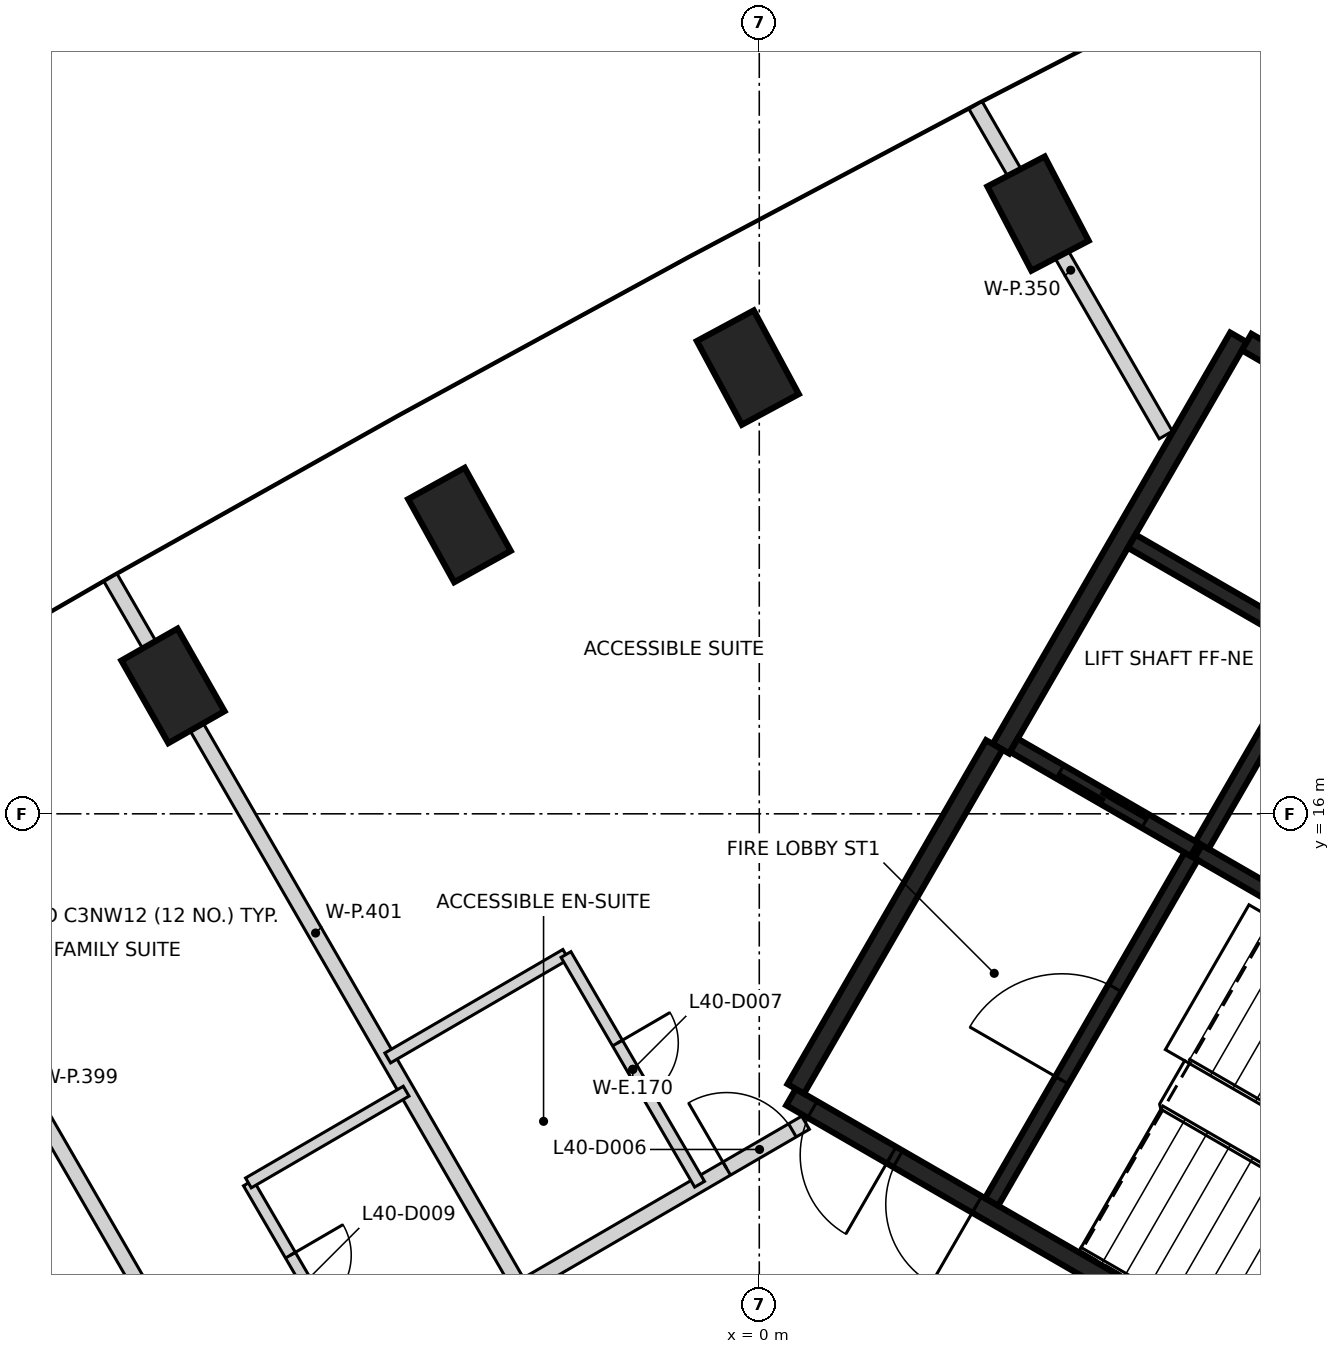
"""IFC4 building model, lengths in metres.
Left out: names, types, materials, properties, quantities, classifications, styles, units other than length and angle.
Written with IfcOpenShell. Run it as: python <this file> out.ifc"""

import sys

from ifc_helpers import new_model, si_unit, direction, frame, frame_2d, origin, origin_2d, place, context, subcontext, project, spatial, rectangle, extrude, element, fill, save


model = new_model("IFC4")
c1 = context("Model", 3, precision=1e-05, world=origin(), true_north=direction((0.0, 1.0)))
c2 = subcontext(c1, "Body", "Model", "MODEL_VIEW")
j1 = project(units=[si_unit("LENGTHUNIT", "METRE"), si_unit("PLANEANGLEUNIT", "RADIAN")], contexts=[c1])
p1 = place(None, origin())
s1 = spatial("IfcSite", under=j1, at=p1, CompositionType="ELEMENT")
p2 = place(p1, origin())
s2 = spatial("IfcBuilding", under=s1, at=p2, CompositionType="ELEMENT")
p3 = place(p2, frame((0.0, 0.0, 161.2)))
s3 = spatial("IfcBuildingStorey", under=s2, at=p3, CompositionType="ELEMENT", Elevation=161.2)
for number, where, z_axis, x_axis in (
    (1, (3.667, 23.896, -0.4), (0.0, 0.0, 1.0), (-0.463, 0.886, 0.0)),
    (2, (-0.151, 21.871, -0.4), (0.0, 0.0, 1.0), (-0.474, 0.881, 0.0)),
    (3, (-3.945, 19.8, -0.4), (0.0, 0.0, 1.0), (-0.485, 0.875, 0.0)),
    (4, (-7.714, 17.683, -0.4), (0.0, 0.0, 1.0), (-0.495, 0.869, 0.0)),
):
    element("IfcColumn", number, at=place(p3, frame(where, z_axis=z_axis, x_axis=x_axis)), inside=s3, PredefinedType="COLUMN", context=c2, shape_type="SweptSolid", body=[
        extrude(rectangle(XDim=1.25, YDim=0.85, at=origin_2d()), origin(), (0.0, 0.0, 1.0), 2.884),
    ])
p4 = place(p3, frame((10.42, 6.498, 0.0), z_axis=(0.0, 0.0, 1.0), x_axis=(-0.866021906294, 0.500006057782, 0.0)))
e5 = element("IfcWall", 5, at=p4, inside=s3, PredefinedType="SHEAR", context=c2, shape_type="SweptSolid", body=[
    extrude(rectangle(XDim=11.55, YDim=0.25, at=frame_2d((5.775, 0.0))), origin(), (0.0, 0.0, 1.0), 3.2),
])
p5 = place(p4, frame((10.025, 0.0, 0.0)))
e6 = element("IfcOpeningElement", 6, at=p5, cuts=e5, PredefinedType="OPENING", context=c2, shape_type="SweptSolid", body=[
    extrude(rectangle(XDim=1.2, YDim=2.1, at=frame_2d((0.6, 1.05))), frame((0.0, 0.135, 0.0), z_axis=(0.0, -1.0, 0.0), x_axis=(1.0, 0.0, 0.0)), (0.0, 0.0, 1.0), 0.27),
])
p6 = place(p4, frame((8.725, 0.0, 0.0)))
e7 = element("IfcOpeningElement", 7, at=p6, cuts=e5, PredefinedType="OPENING", context=c2, shape_type="SweptSolid", body=[
    extrude(rectangle(XDim=1.2, YDim=2.1, at=frame_2d((0.6, 1.05))), frame((0.0, 0.135, 0.0), z_axis=(0.0, -1.0, 0.0), x_axis=(1.0, 0.0, 0.0)), (0.0, 0.0, 1.0), 0.27),
])
p7 = place(p3, frame((3.179, 16.856, 0.0), z_axis=(0.0, 0.0, 1.0), x_axis=(0.500004234368, 0.866022959057, 0.0)))
e8 = element("IfcWall", 8, at=p7, inside=s3, PredefinedType="SHEAR", context=c2, shape_type="SweptSolid", body=[
    extrude(rectangle(XDim=6.25, YDim=0.25, at=frame_2d((3.125, 0.0))), origin(), (0.0, 0.0, 1.0), 3.2),
])
p8 = place(p3, frame((0.48, 12.381, 0.0), z_axis=(0.0, 0.0, 1.0), x_axis=(0.49999885962, 0.866026062182, 0.0)))
e9 = element("IfcWall", 9, at=p8, inside=s3, PredefinedType="SHEAR", context=c2, shape_type="SweptSolid", body=[
    extrude(rectangle(XDim=5.225, YDim=0.25, at=frame_2d((2.612, 0.0))), origin(), (0.0, 0.0, 1.0), 3.2),
])
p9 = place(p3, frame((6.413, 22.206, 0.0), z_axis=(0.0, 0.0, 1.0), x_axis=(0.866016279763, -0.500015802937, 0.0)))
e10 = element("IfcWall", 10, at=p9, inside=s3, PredefinedType="SHEAR", context=c2, shape_type="SweptSolid", body=[
    extrude(rectangle(XDim=1.849, YDim=0.25, at=frame_2d((0.925, 0.0))), origin(), (0.0, 0.0, 1.0), 3.2),
])
p10 = place(p3, frame((5.775, 15.502, 0.0), z_axis=(0.0, 0.0, 1.0), x_axis=(0.866020080793, -0.500009219579, 0.0)))
e11 = element("IfcWall", 11, at=p10, inside=s3, PredefinedType="SHEAR", context=c2, shape_type="SweptSolid", body=[
    extrude(rectangle(XDim=5.699, YDim=0.2, at=frame_2d((2.85, 0.0))), origin(), (0.0, 0.0, 1.0), 3.2),
])
p11 = place(p3, frame((3.057, 10.895, 0.0), z_axis=(0.0, 0.0, 1.0), x_axis=(0.499989418164, 0.866031513124, 0.0)))
e12 = element("IfcWall", 12, at=p11, inside=s3, PredefinedType="SHEAR", context=c2, shape_type="SweptSolid", body=[
    extrude(rectangle(XDim=5.251, YDim=0.2, at=frame_2d((2.625, 0.0))), origin(), (0.0, 0.0, 1.0), 3.2),
])
p12 = place(p11, frame((1.849, 0.0, 0.0)))
e13 = element("IfcOpeningElement", 13, at=p12, cuts=e12, PredefinedType="OPENING", context=c2, shape_type="SweptSolid", body=[
    extrude(rectangle(XDim=1.4, YDim=2.1, at=frame_2d((0.7, 1.05))), frame((0.0, 0.11, 0.0), z_axis=(0.0, -1.0, 0.0), x_axis=(1.0, 0.0, 0.0)), (0.0, 0.0, 1.0), 0.22),
])
p13 = place(p3, frame((7.199, 17.97, 0.0), z_axis=(0.0, 0.0, 1.0), x_axis=(-0.499968400327, -0.866043647095, 0.0)))
e14 = element("IfcWall", 14, at=p13, inside=s3, PredefinedType="SHEAR", context=c2, shape_type="SweptSolid", body=[
    extrude(rectangle(XDim=2.75, YDim=0.2, at=frame_2d((1.375, 0.0))), origin(), (0.0, 0.0, 1.0), 3.2),
])
p14 = place(p3, frame((5.725, 15.531, 0.0), z_axis=(0.0, 0.0, 1.0), x_axis=(-0.866037306777, 0.499979382845, 0.0)))
e15 = element("IfcWall", 15, at=p14, inside=s3, PredefinedType="SHEAR", context=c2, shape_type="SweptSolid", body=[
    extrude(rectangle(XDim=2.742, YDim=0.2, at=frame_2d((1.371, 0.0))), origin(), (0.0, 0.0, 1.0), 3.2),
])
p15 = place(p14, frame((0.743, 0.0, 0.0)))
e16 = element("IfcOpeningElement", 16, at=p15, cuts=e15, PredefinedType="OPENING", context=c2, shape_type="SweptSolid", body=[
    extrude(rectangle(XDim=1.3, YDim=2.1, at=frame_2d((0.65, 1.05))), frame((0.0, 0.11, 0.0), z_axis=(0.0, -1.0, 0.0), x_axis=(1.0, 0.0, 0.0)), (0.0, 0.0, 1.0), 0.22),
])
p16 = place(p3, frame((4.901, 19.586, 0.0), z_axis=(0.0, 0.0, 1.0), x_axis=(0.866022890907, -0.500004352405, 0.0)))
e17 = element("IfcWall", 17, at=p16, inside=s3, PredefinedType="SHEAR", context=c2, shape_type="SweptSolid", body=[
    extrude(rectangle(XDim=2.799, YDim=0.2, at=frame_2d((1.399, 0.0))), origin(), (0.0, 0.0, 1.0), 3.2),
])
p17 = place(p3, frame((-8.462, 6.664, 0.0), z_axis=(0.0, 0.0, 1.0), x_axis=(0.864575369233, 0.502503165081, 0.0)))
e18 = element("IfcWall", 18, at=p17, inside=s3, PredefinedType="PARTITIONING", context=c2, shape_type="SweptSolid", body=[
    extrude(rectangle(XDim=10.492, YDim=0.2, at=frame_2d((5.246, 0.0))), origin(), (0.0, 0.0, 1.0), 3.2),
])
p18 = place(p17, frame((9.292, 0.0, 0.0)))
e19 = element("IfcOpeningElement", 19, at=p18, cuts=e18, PredefinedType="OPENING", context=c2, shape_type="SweptSolid", body=[
    extrude(rectangle(XDim=1.0, YDim=2.1, at=frame_2d((0.5, 1.05))), frame((0.0, 0.11, 0.0), z_axis=(0.0, -1.0, 0.0), x_axis=(1.0, 0.0, 0.0)), (0.0, 0.0, 1.0), 0.22),
])
p19 = place(p17, frame((2.024, 0.0, 0.0)))
e20 = element("IfcOpeningElement", 20, at=p19, cuts=e18, PredefinedType="OPENING", context=c2, shape_type="SweptSolid", body=[
    extrude(rectangle(XDim=0.95, YDim=2.1, at=frame_2d((0.475, 1.05))), frame((0.0, 0.11, 0.0), z_axis=(0.0, -1.0, 0.0), x_axis=(1.0, 0.0, 0.0)), (0.0, 0.0, 1.0), 0.22),
])
p20 = place(p17, frame((0.698, 0.0, 0.0)))
e21 = element("IfcOpeningElement", 21, at=p20, cuts=e18, PredefinedType="OPENING", context=c2, shape_type="SweptSolid", body=[
    extrude(rectangle(XDim=0.95, YDim=2.1, at=frame_2d((0.475, 1.05))), frame((0.0, 0.11, 0.0), z_axis=(0.0, -1.0, 0.0), x_axis=(1.0, 0.0, 0.0)), (0.0, 0.0, 1.0), 0.22),
])
p21 = place(p3, frame((-12.279, 16.946, 0.0), z_axis=(0.0, 0.0, 1.0), x_axis=(0.500003997498, -0.866023095816, 0.0)))
e22 = element("IfcWall", 22, at=p21, inside=s3, PredefinedType="PARTITIONING", context=c2, shape_type="SweptSolid", body=[
    extrude(rectangle(XDim=10.809, YDim=0.2, at=frame_2d((5.405, 0.0))), origin(), (0.0, 0.0, 1.0), 3.2),
])
p22 = place(p3, frame((-8.535, 19.107, 0.0), z_axis=(0.0, 0.0, 1.0), x_axis=(0.499882324153, -0.866093333307, 0.0)))
e23 = element("IfcWall", 23, at=p22, inside=s3, PredefinedType="PARTITIONING", context=c2, shape_type="SweptSolid", body=[
    extrude(rectangle(XDim=10.796, YDim=0.2, at=frame_2d((5.398, 0.0))), origin(), (0.0, 0.0, 1.0), 3.2),
])
p23 = place(p3, frame((2.845, 25.321, 0.0), z_axis=(0.0, 0.0, 1.0), x_axis=(0.499751996305, -0.866168541445, 0.0)))
e24 = element("IfcWall", 24, at=p23, inside=s3, PredefinedType="PARTITIONING", context=c2, shape_type="SweptSolid", body=[
    extrude(rectangle(XDim=5.008, YDim=0.2, at=frame_2d((2.504, 0.0))), origin(), (0.0, 0.0, 1.0), 3.2),
])
p24 = place(p3, frame((-6.721, 11.144, 0.0), z_axis=(0.0, 0.0, 1.0), x_axis=(0.502742108773, -0.864436447673, 0.0)))
e25 = element("IfcWall", 25, at=p24, inside=s3, PredefinedType="PARTITIONING", context=c2, shape_type="SweptSolid", body=[
    extrude(rectangle(XDim=3.0, YDim=0.15, at=frame_2d((1.5, 0.0))), origin(), (0.0, 0.0, 1.0), 3.2),
])
p25 = place(p24, frame((1.1, 0.0, 0.0)))
e26 = element("IfcOpeningElement", 26, at=p25, cuts=e25, PredefinedType="OPENING", context=c2, shape_type="SweptSolid", body=[
    extrude(rectangle(XDim=0.8, YDim=2.1, at=frame_2d((0.4, 1.05))), frame((0.0, 0.085, 0.0), z_axis=(0.0, -1.0, 0.0), x_axis=(1.0, 0.0, 0.0)), (0.0, 0.0, 1.0), 0.17),
])
p26 = place(p3, frame((-6.721, 11.144, 0.0), z_axis=(0.0, 0.0, 1.0), x_axis=(0.864386917082, 0.502827264155, 0.0)))
e27 = element("IfcWall", 27, at=p26, inside=s3, PredefinedType="PARTITIONING", context=c2, shape_type="SweptSolid", body=[
    extrude(rectangle(XDim=2.4, YDim=0.15, at=frame_2d((1.2, 0.0))), origin(), (0.0, 0.0, 1.0), 3.2),
])
p27 = place(p3, frame((-4.888, 12.788, 0.0), z_axis=(0.0, 0.0, 1.0), x_axis=(0.864480777266, 0.502665878827, 0.0)))
e28 = element("IfcWall", 28, at=p27, inside=s3, PredefinedType="PARTITIONING", context=c2, shape_type="SweptSolid", body=[
    extrude(rectangle(XDim=2.709, YDim=0.15, at=frame_2d((1.354, 0.0))), origin(), (0.0, 0.0, 1.0), 3.2),
])
p28 = place(p3, frame((-2.543, 14.149, 0.0), z_axis=(0.0, 0.0, 1.0), x_axis=(0.502854686853, -0.864370964292, 0.0)))
e29 = element("IfcWall", 29, at=p28, inside=s3, PredefinedType="PARTITIONING", context=c2, shape_type="SweptSolid", body=[
    extrude(rectangle(XDim=3.496, YDim=0.15, at=frame_2d((1.748, 0.0))), origin(), (0.0, 0.0, 1.0), 3.2),
])
p29 = place(p28, frame((1.348, 0.0, 0.0)))
e30 = element("IfcOpeningElement", 30, at=p29, cuts=e29, PredefinedType="OPENING", context=c2, shape_type="SweptSolid", body=[
    extrude(rectangle(XDim=0.8, YDim=2.1, at=frame_2d((0.4, 1.05))), frame((0.0, 0.085, 0.0), z_axis=(0.0, -1.0, 0.0), x_axis=(1.0, 0.0, 0.0)), (0.0, 0.0, 1.0), 0.17),
])
p30 = place(p15, origin())
e31 = element("IfcDoor", 31, at=p30, inside=s3, OperationType="SLIDING_TO_LEFT", PredefinedType="DOOR", context=c2, shape_type="SweptSolid", body=[
    extrude(rectangle(XDim=1.3, YDim=2.1, at=frame_2d((0.65, 1.05))), frame((0.0, 0.025, 0.0), z_axis=(0.0, -1.0, 0.0), x_axis=(1.0, 0.0, 0.0)), (0.0, 0.0, 1.0), 0.05),
])
fill(e16, e31)
p31 = place(p5, origin())
e32 = element("IfcDoor", 32, at=p31, inside=s3, OperationType="SINGLE_SWING_LEFT", PredefinedType="DOOR", context=c2, shape_type="SweptSolid", body=[
    extrude(rectangle(XDim=1.2, YDim=2.1, at=frame_2d((0.6, 1.05))), frame((0.0, 0.025, 0.0), z_axis=(0.0, -1.0, 0.0), x_axis=(1.0, 0.0, 0.0)), (0.0, 0.0, 1.0), 0.05),
])
fill(e6, e32)
p32 = place(p6, origin())
e33 = element("IfcDoor", 33, at=p32, inside=s3, OperationType="SINGLE_SWING_RIGHT", PredefinedType="DOOR", context=c2, shape_type="SweptSolid", body=[
    extrude(rectangle(XDim=1.2, YDim=2.1, at=frame_2d((0.6, 1.05))), frame((0.0, 0.025, 0.0), z_axis=(0.0, -1.0, 0.0), x_axis=(1.0, 0.0, 0.0)), (0.0, 0.0, 1.0), 0.05),
])
fill(e7, e33)
p33 = place(p12, origin())
e34 = element("IfcDoor", 34, at=p33, inside=s3, OperationType="SINGLE_SWING_LEFT", PredefinedType="DOOR", context=c2, shape_type="SweptSolid", body=[
    extrude(rectangle(XDim=1.4, YDim=2.1, at=frame_2d((0.7, 1.05))), frame((0.0, 0.025, 0.0), z_axis=(0.0, -1.0, 0.0), x_axis=(1.0, 0.0, 0.0)), (0.0, 0.0, 1.0), 0.05),
])
fill(e13, e34)
p34 = place(p18, origin())
e35 = element("IfcDoor", 35, at=p34, inside=s3, OperationType="SINGLE_SWING_LEFT", PredefinedType="DOOR", context=c2, shape_type="SweptSolid", body=[
    extrude(rectangle(XDim=1.0, YDim=2.1, at=frame_2d((0.5, 1.05))), frame((0.0, 0.025, 0.0), z_axis=(0.0, -1.0, 0.0), x_axis=(1.0, 0.0, 0.0)), (0.0, 0.0, 1.0), 0.05),
])
fill(e19, e35)
p35 = place(p29, origin())
e36 = element("IfcDoor", 36, at=p35, inside=s3, OperationType="SINGLE_SWING_LEFT", PredefinedType="DOOR", context=c2, shape_type="SweptSolid", body=[
    extrude(rectangle(XDim=0.8, YDim=2.1, at=frame_2d((0.4, 1.05))), frame((0.0, 0.025, 0.0), z_axis=(0.0, -1.0, 0.0), x_axis=(1.0, 0.0, 0.0)), (0.0, 0.0, 1.0), 0.05),
])
fill(e30, e36)
p36 = place(p25, origin())
e37 = element("IfcDoor", 37, at=p36, inside=s3, OperationType="SINGLE_SWING_LEFT", PredefinedType="DOOR", context=c2, shape_type="SweptSolid", body=[
    extrude(rectangle(XDim=0.8, YDim=2.1, at=frame_2d((0.4, 1.05))), frame((0.0, 0.025, 0.0), z_axis=(0.0, -1.0, 0.0), x_axis=(1.0, 0.0, 0.0)), (0.0, 0.0, 1.0), 0.05),
])
fill(e26, e37)
save(model, sys.argv[1])
